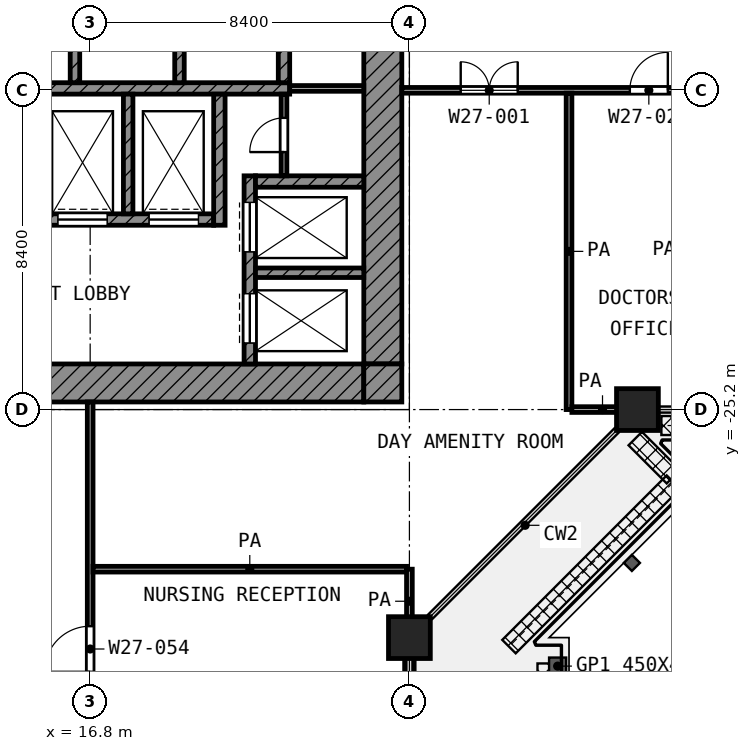
"""IFC4 building model, lengths in metres.
Left out: names, types, materials, properties, quantities, classifications, styles, units other than length and angle.
Written with IfcOpenShell. Run it as: python <this file> out.ifc"""

import sys

from ifc_helpers import new_model, si_unit, direction, frame, frame_2d, origin, origin_2d, place, context, subcontext, project, spatial, rectangle, extrude, element, fill, save


model = new_model("IFC4")
c1 = context("Model", 3, precision=1e-05, world=origin(), true_north=direction((0.0, 1.0)))
c2 = subcontext(c1, "Body", "Model", "MODEL_VIEW")
j1 = project(units=[si_unit("LENGTHUNIT", "METRE"), si_unit("PLANEANGLEUNIT", "RADIAN")], contexts=[c1])
p1 = place(None, origin())
s1 = spatial("IfcSite", under=j1, at=p1, CompositionType="ELEMENT")
p2 = place(p1, origin())
s2 = spatial("IfcBuilding", under=s1, at=p2, CompositionType="ELEMENT")
p3 = place(p2, frame((0.0, 0.0, 119.8)))
s3 = spatial("IfcBuildingStorey", under=s2, at=p3, CompositionType="ELEMENT", Elevation=119.8)
for number, where, z_axis, x_axis in (
    (1, (31.2, -25.2, 0.0), (0.0, 0.0, 1.0), (1.0, 0.0, 0.0)),
    (2, (25.2, -31.2, 0.0), (0.0, 0.0, 1.0), (1.0, 0.0, 0.0)),
):
    element("IfcColumn", number, at=place(p3, frame(where, z_axis=z_axis, x_axis=x_axis)), inside=s3, PredefinedType="COLUMN", context=c2, shape_type="SweptSolid", body=[
        extrude(rectangle(XDim=1.1, YDim=1.1, at=origin_2d()), origin(), (0.0, 0.0, 1.0), 4.2),
    ])
p4 = place(p3, frame((25.2, -34.992, 0.0), z_axis=(0.0, 0.0, 1.0), x_axis=(0.0, 1.0, 0.0)))
e3 = element("IfcWall", 3, at=p4, inside=s3, PredefinedType="SOLIDWALL", context=c2, shape_type="SweptSolid", body=[
    extrude(rectangle(XDim=3.242, YDim=0.25, at=frame_2d((1.621, 0.0))), origin(), (0.0, 0.0, 1.0), 3.48),
])
p5 = place(p4, frame((1.621, 0.0, 0.0)))
e4 = element("IfcOpeningElement", 4, at=p5, cuts=e3, PredefinedType="OPENING", context=c2, shape_type="SweptSolid", body=[
    extrude(rectangle(XDim=1.0, YDim=2.1, at=frame_2d((0.5, 1.05))), frame((0.0, 0.135, 0.0), z_axis=(0.0, -1.0, 0.0), x_axis=(1.0, 0.0, 0.0)), (0.0, 0.0, 1.0), 0.27),
])
p6 = place(p3, frame((24.5, -24.0, 0.0), z_axis=(0.0, 0.0, 1.0), x_axis=(0.0, 1.0, 0.0)))
e5 = element("IfcWall", 5, at=p6, inside=s3, PredefinedType="SHEAR", context=c2, shape_type="SweptSolid", body=[
    extrude(rectangle(XDim=18.6, YDim=1.0, at=frame_2d((9.3, 0.0))), origin(), (0.0, 0.0, 1.0), 3.6),
])
p7 = place(p6, frame((10.5, 0.0, 0.0)))
e6 = element("IfcOpeningElement", 6, at=p7, cuts=e5, PredefinedType="OPENING", context=c2, shape_type="SweptSolid", body=[
    extrude(rectangle(XDim=1.8, YDim=2.1, at=frame_2d((0.9, 1.05))), frame((0.0, 0.51, 0.0), z_axis=(0.0, -1.0, 0.0), x_axis=(1.0, 0.0, 0.0)), (0.0, 0.0, 1.0), 1.02),
])
p8 = place(p3, frame((5.4, -24.5, 0.0), z_axis=(0.0, 0.0, 1.0), x_axis=(1.0, 0.0, 0.0)))
e7 = element("IfcWall", 7, at=p8, inside=s3, PredefinedType="SHEAR", context=c2, shape_type="SweptSolid", body=[
    extrude(rectangle(XDim=18.6, YDim=1.0, at=frame_2d((9.3, 0.0))), origin(), (0.0, 0.0, 1.0), 3.6),
])
p9 = place(p8, frame((6.3, 0.0, 0.0)))
e8 = element("IfcOpeningElement", 8, at=p9, cuts=e7, PredefinedType="OPENING", context=c2, shape_type="SweptSolid", body=[
    extrude(rectangle(XDim=1.8, YDim=2.1, at=frame_2d((0.9, 1.05))), frame((0.0, 0.51, 0.0), z_axis=(0.0, -1.0, 0.0), x_axis=(1.0, 0.0, 0.0)), (0.0, 0.0, 1.0), 1.02),
])
p10 = place(p3, frame((24.5, -25.0, 0.0), z_axis=(0.0, 0.0, 1.0), x_axis=(0.0, 1.0, 0.0)))
e9 = element("IfcWall", 9, at=p10, inside=s3, PredefinedType="SHEAR", context=c2, shape_type="SweptSolid", body=[
    extrude(rectangle(XDim=1.0, YDim=1.0, at=frame_2d((0.5, 0.0))), origin(), (0.0, 0.0, 1.0), 3.6),
])
p11 = place(p3, frame((5.4, -16.75, 0.0), z_axis=(0.0, 0.0, 1.0), x_axis=(1.0, 0.0, 0.0)))
e10 = element("IfcWall", 10, at=p11, inside=s3, PredefinedType="SHEAR", context=c2, shape_type="SweptSolid", body=[
    extrude(rectangle(XDim=16.65, YDim=0.3, at=frame_2d((8.325, 0.0))), origin(), (0.0, 0.0, 1.0), 3.6),
])
p12 = place(p3, frame((5.4, -20.2, 0.0), z_axis=(0.0, 0.0, 1.0), x_axis=(1.0, 0.0, 0.0)))
e11 = element("IfcWall", 11, at=p12, inside=s3, PredefinedType="SHEAR", context=c2, shape_type="SweptSolid", body=[
    extrude(rectangle(XDim=14.65, YDim=0.3, at=frame_2d((7.325, 0.0))), origin(), (0.0, 0.0, 1.0), 3.6),
])
p13 = place(p12, frame((10.55, 0.0, 0.0)))
e12 = element("IfcOpeningElement", 12, at=p13, cuts=e11, PredefinedType="OPENING", context=c2, shape_type="SweptSolid", body=[
    extrude(rectangle(XDim=1.3, YDim=2.1, at=frame_2d((0.65, 1.05))), frame((0.0, 0.16, 0.0), z_axis=(0.0, -1.0, 0.0), x_axis=(1.0, 0.0, 0.0)), (0.0, 0.0, 1.0), 0.32),
])
p14 = place(p12, frame((12.95, 0.0, 0.0)))
e13 = element("IfcOpeningElement", 13, at=p14, cuts=e11, PredefinedType="OPENING", context=c2, shape_type="SweptSolid", body=[
    extrude(rectangle(XDim=1.3, YDim=2.1, at=frame_2d((0.65, 1.05))), frame((0.0, 0.16, 0.0), z_axis=(0.0, -1.0, 0.0), x_axis=(1.0, 0.0, 0.0)), (0.0, 0.0, 1.0), 0.32),
])
p15 = place(p12, frame((0.55, 0.0, 0.0)))
e14 = element("IfcOpeningElement", 14, at=p15, cuts=e11, PredefinedType="OPENING", context=c2, shape_type="SweptSolid", body=[
    extrude(rectangle(XDim=1.3, YDim=2.1, at=frame_2d((0.65, 1.05))), frame((0.0, 0.16, 0.0), z_axis=(0.0, -1.0, 0.0), x_axis=(1.0, 0.0, 0.0)), (0.0, 0.0, 1.0), 0.32),
])
p16 = place(p12, frame((2.95, 0.0, 0.0)))
e15 = element("IfcOpeningElement", 15, at=p16, cuts=e11, PredefinedType="OPENING", context=c2, shape_type="SweptSolid", body=[
    extrude(rectangle(XDim=1.3, YDim=2.1, at=frame_2d((0.65, 1.05))), frame((0.0, 0.16, 0.0), z_axis=(0.0, -1.0, 0.0), x_axis=(1.0, 0.0, 0.0)), (0.0, 0.0, 1.0), 0.32),
])
p17 = place(p12, frame((7.15, 0.0, 0.0)))
e16 = element("IfcOpeningElement", 16, at=p17, cuts=e11, PredefinedType="OPENING", context=c2, shape_type="SweptSolid", body=[
    extrude(rectangle(XDim=0.9, YDim=2.1, at=frame_2d((0.45, 1.05))), frame((0.0, 0.16, 0.0), z_axis=(0.0, -1.0, 0.0), x_axis=(1.0, 0.0, 0.0)), (0.0, 0.0, 1.0), 0.32),
])
p18 = place(p3, frame((20.2, -20.35, 0.0), z_axis=(0.0, 0.0, 1.0), x_axis=(0.0, 1.0, 0.0)))
e17 = element("IfcWall", 17, at=p18, inside=s3, PredefinedType="SHEAR", context=c2, shape_type="SweptSolid", body=[
    extrude(rectangle(XDim=3.45, YDim=0.3, at=frame_2d((1.725, 0.0))), origin(), (0.0, 0.0, 1.0), 3.6),
])
p19 = place(p3, frame((21.9, -16.6, 0.0), z_axis=(0.0, 0.0, 1.0), x_axis=(0.0, 1.0, 0.0)))
e18 = element("IfcWall", 18, at=p19, inside=s3, PredefinedType="SHEAR", context=c2, shape_type="SweptSolid", body=[
    extrude(rectangle(XDim=2.35, YDim=0.3, at=frame_2d((1.175, 0.0))), origin(), (0.0, 0.0, 1.0), 3.6),
])
p20 = place(p3, frame((21.15, -19.2, 0.0), z_axis=(0.0, 0.0, 1.0), x_axis=(1.0, 0.0, 0.0)))
e19 = element("IfcWall", 19, at=p20, inside=s3, PredefinedType="SHEAR", context=c2, shape_type="SweptSolid", body=[
    extrude(rectangle(XDim=2.85, YDim=0.3, at=frame_2d((1.425, 0.0))), origin(), (0.0, 0.0, 1.0), 3.6),
])
p21 = place(p3, frame((21.0, -24.0, 0.0), z_axis=(0.0, 0.0, 1.0), x_axis=(0.0, 1.0, 0.0)))
e20 = element("IfcWall", 20, at=p21, inside=s3, PredefinedType="SHEAR", context=c2, shape_type="SweptSolid", body=[
    extrude(rectangle(XDim=4.95, YDim=0.3, at=frame_2d((2.475, 0.0))), origin(), (0.0, 0.0, 1.0), 3.6),
])
p22 = place(p21, frame((2.95, 0.0, 0.0)))
e21 = element("IfcOpeningElement", 21, at=p22, cuts=e20, PredefinedType="OPENING", context=c2, shape_type="SweptSolid", body=[
    extrude(rectangle(XDim=1.3, YDim=2.1, at=frame_2d((0.65, 1.05))), frame((0.0, 0.16, 0.0), z_axis=(0.0, -1.0, 0.0), x_axis=(1.0, 0.0, 0.0)), (0.0, 0.0, 1.0), 0.32),
])
p23 = place(p21, frame((0.55, 0.0, 0.0)))
e22 = element("IfcOpeningElement", 22, at=p23, cuts=e20, PredefinedType="OPENING", context=c2, shape_type="SweptSolid", body=[
    extrude(rectangle(XDim=1.3, YDim=2.1, at=frame_2d((0.65, 1.05))), frame((0.0, 0.16, 0.0), z_axis=(0.0, -1.0, 0.0), x_axis=(1.0, 0.0, 0.0)), (0.0, 0.0, 1.0), 0.32),
])
p24 = place(p3, frame((21.15, -21.6, 0.0), z_axis=(0.0, 0.0, 1.0), x_axis=(1.0, 0.0, 0.0)))
e23 = element("IfcWall", 23, at=p24, inside=s3, PredefinedType="SHEAR", context=c2, shape_type="SweptSolid", body=[
    extrude(rectangle(XDim=2.85, YDim=0.25, at=frame_2d((1.425, 0.0))), origin(), (0.0, 0.0, 1.0), 3.6),
])
p25 = place(p3, frame((17.8, -20.05, 0.0), z_axis=(0.0, 0.0, 1.0), x_axis=(0.0, 1.0, 0.0)))
e24 = element("IfcWall", 24, at=p25, inside=s3, PredefinedType="SHEAR", context=c2, shape_type="SweptSolid", body=[
    extrude(rectangle(XDim=3.15, YDim=0.25, at=frame_2d((1.575, 0.0))), origin(), (0.0, 0.0, 1.0), 3.6),
])
for number, where, z_axis, x_axis in (
    (25, (16.4, -16.6, 0.0), (0.0, 0.0, 1.0), (0.0, 1.0, 0.0)),
    (26, (19.15, -16.6, 0.0), (0.0, 0.0, 1.0), (0.0, 1.0, 0.0)),
):
    element("IfcWall", number, at=place(p3, frame(where, z_axis=z_axis, x_axis=x_axis)), inside=s3, PredefinedType="SHEAR", context=c2, shape_type="SweptSolid", body=[
        extrude(rectangle(XDim=2.35, YDim=0.25, at=frame_2d((1.175, 0.0))), origin(), (0.0, 0.0, 1.0), 3.6),
    ])
p26 = place(p3, frame((21.9, -19.05, 0.0), z_axis=(0.0, 0.0, 1.0), x_axis=(0.0, 1.0, 0.0)))
e27 = element("IfcWall", 27, at=p26, inside=s3, PredefinedType="PARTITIONING", context=c2, shape_type="SweptSolid", body=[
    extrude(rectangle(XDim=2.15, YDim=0.15, at=frame_2d((1.075, 0.0))), origin(), (0.0, 0.0, 1.0), 3.6),
])
p27 = place(p26, frame((0.625, 0.0, 0.0)))
e28 = element("IfcOpeningElement", 28, at=p27, cuts=e27, PredefinedType="OPENING", context=c2, shape_type="SweptSolid", body=[
    extrude(rectangle(XDim=0.9, YDim=2.1, at=frame_2d((0.45, 1.05))), frame((0.0, 0.085, 0.0), z_axis=(0.0, -1.0, 0.0), x_axis=(1.0, 0.0, 0.0)), (0.0, 0.0, 1.0), 0.17),
])
p28 = place(p3, frame((22.05, -16.75, 0.0), z_axis=(0.0, 0.0, 1.0), x_axis=(1.0, 0.0, 0.0)))
e29 = element("IfcWall", 29, at=p28, inside=s3, PredefinedType="PARTITIONING", context=c2, shape_type="SweptSolid", body=[
    extrude(rectangle(XDim=1.95, YDim=0.15, at=frame_2d((0.975, 0.0))), origin(), (0.0, 0.0, 1.0), 3.6),
])
p29 = place(p3, frame((16.875, -29.4, 0.0), z_axis=(0.0, 0.0, 1.0), x_axis=(1.0, 0.0, 0.0)))
e30 = element("IfcWall", 30, at=p29, inside=s3, PredefinedType="PARTITIONING", context=c2, shape_type="SweptSolid", body=[
    extrude(rectangle(XDim=8.25, YDim=0.15, at=frame_2d((4.125, 0.0))), origin(), (0.0, 0.0, 1.0), 3.6),
])
p30 = place(p3, frame((29.475, -25.2, 0.0), z_axis=(0.0, 0.0, 1.0), x_axis=(1.0, 0.0, 0.0)))
e31 = element("IfcWall", 31, at=p30, inside=s3, PredefinedType="PARTITIONING", context=c2, shape_type="SweptSolid", body=[
    extrude(rectangle(XDim=1.612, YDim=0.15, at=frame_2d((0.806, 0.0))), origin(), (0.0, 0.0, 1.0), 3.6),
])
p31 = place(p3, frame((25.0, -16.8, 0.0), z_axis=(0.0, 0.0, 1.0), x_axis=(1.0, 0.0, 0.0)))
e32 = element("IfcWall", 32, at=p31, inside=s3, PredefinedType="PARTITIONING", context=c2, shape_type="SweptSolid", body=[
    extrude(rectangle(XDim=50.52, YDim=0.15, at=frame_2d((25.26, 0.0))), origin(), (0.0, 0.0, 1.0), 3.6),
])
p32 = place(p31, frame((1.55, 0.0, 0.0)))
e33 = element("IfcOpeningElement", 33, at=p32, cuts=e32, PredefinedType="OPENING", context=c2, shape_type="SweptSolid", body=[
    extrude(rectangle(XDim=1.5, YDim=2.1, at=frame_2d((0.75, 1.05))), frame((0.0, 0.085, 0.0), z_axis=(0.0, -1.0, 0.0), x_axis=(1.0, 0.0, 0.0)), (0.0, 0.0, 1.0), 0.17),
])
p33 = place(p31, frame((6.0, 0.0, 0.0)))
e34 = element("IfcOpeningElement", 34, at=p33, cuts=e32, PredefinedType="OPENING", context=c2, shape_type="SweptSolid", body=[
    extrude(rectangle(XDim=1.0, YDim=2.1, at=frame_2d((0.5, 1.05))), frame((0.0, 0.085, 0.0), z_axis=(0.0, -1.0, 0.0), x_axis=(1.0, 0.0, 0.0)), (0.0, 0.0, 1.0), 0.17),
])
p34 = place(p31, frame((9.3, 0.0, 0.0)))
e35 = element("IfcOpeningElement", 35, at=p34, cuts=e32, PredefinedType="OPENING", context=c2, shape_type="SweptSolid", body=[
    extrude(rectangle(XDim=1.2, YDim=2.1, at=frame_2d((0.6, 1.05))), frame((0.0, 0.085, 0.0), z_axis=(0.0, -1.0, 0.0), x_axis=(1.0, 0.0, 0.0)), (0.0, 0.0, 1.0), 0.17),
])
p35 = place(p31, frame((17.9, 0.0, 0.0)))
e36 = element("IfcOpeningElement", 36, at=p35, cuts=e32, PredefinedType="OPENING", context=c2, shape_type="SweptSolid", body=[
    extrude(rectangle(XDim=1.2, YDim=2.1, at=frame_2d((0.6, 1.05))), frame((0.0, 0.085, 0.0), z_axis=(0.0, -1.0, 0.0), x_axis=(1.0, 0.0, 0.0)), (0.0, 0.0, 1.0), 0.17),
])
p36 = place(p31, frame((15.2, 0.0, 0.0)))
e37 = element("IfcOpeningElement", 37, at=p36, cuts=e32, PredefinedType="OPENING", context=c2, shape_type="SweptSolid", body=[
    extrude(rectangle(XDim=1.2, YDim=2.1, at=frame_2d((0.6, 1.05))), frame((0.0, 0.085, 0.0), z_axis=(0.0, -1.0, 0.0), x_axis=(1.0, 0.0, 0.0)), (0.0, 0.0, 1.0), 0.17),
])
p37 = place(p31, frame((20.15, 0.0, 0.0)))
e38 = element("IfcOpeningElement", 38, at=p37, cuts=e32, PredefinedType="OPENING", context=c2, shape_type="SweptSolid", body=[
    extrude(rectangle(XDim=1.2, YDim=2.1, at=frame_2d((0.6, 1.05))), frame((0.0, 0.085, 0.0), z_axis=(0.0, -1.0, 0.0), x_axis=(1.0, 0.0, 0.0)), (0.0, 0.0, 1.0), 0.17),
])
p38 = place(p31, frame((26.025, 0.0, 0.0)))
e39 = element("IfcOpeningElement", 39, at=p38, cuts=e32, PredefinedType="OPENING", context=c2, shape_type="SweptSolid", body=[
    extrude(rectangle(XDim=0.9, YDim=2.1, at=frame_2d((0.45, 1.05))), frame((0.0, 0.085, 0.0), z_axis=(0.0, -1.0, 0.0), x_axis=(1.0, 0.0, 0.0)), (0.0, 0.0, 1.0), 0.17),
])
p39 = place(p31, frame((27.65, 0.0, 0.0)))
e40 = element("IfcOpeningElement", 40, at=p39, cuts=e32, PredefinedType="OPENING", context=c2, shape_type="SweptSolid", body=[
    extrude(rectangle(XDim=1.2, YDim=2.1, at=frame_2d((0.6, 1.05))), frame((0.0, 0.085, 0.0), z_axis=(0.0, -1.0, 0.0), x_axis=(1.0, 0.0, 0.0)), (0.0, 0.0, 1.0), 0.17),
])
p40 = place(p31, frame((32.0, 0.0, 0.0)))
e41 = element("IfcOpeningElement", 41, at=p40, cuts=e32, PredefinedType="OPENING", context=c2, shape_type="SweptSolid", body=[
    extrude(rectangle(XDim=1.2, YDim=2.1, at=frame_2d((0.6, 1.05))), frame((0.0, 0.085, 0.0), z_axis=(0.0, -1.0, 0.0), x_axis=(1.0, 0.0, 0.0)), (0.0, 0.0, 1.0), 0.17),
])
p41 = place(p31, frame((34.8, 0.0, 0.0)))
e42 = element("IfcOpeningElement", 42, at=p41, cuts=e32, PredefinedType="OPENING", context=c2, shape_type="SweptSolid", body=[
    extrude(rectangle(XDim=1.2, YDim=2.1, at=frame_2d((0.6, 1.05))), frame((0.0, 0.085, 0.0), z_axis=(0.0, -1.0, 0.0), x_axis=(1.0, 0.0, 0.0)), (0.0, 0.0, 1.0), 0.17),
])
p42 = place(p31, frame((40.625, 0.0, 0.0)))
e43 = element("IfcOpeningElement", 43, at=p42, cuts=e32, PredefinedType="OPENING", context=c2, shape_type="SweptSolid", body=[
    extrude(rectangle(XDim=0.9, YDim=2.1, at=frame_2d((0.45, 1.05))), frame((0.0, 0.085, 0.0), z_axis=(0.0, -1.0, 0.0), x_axis=(1.0, 0.0, 0.0)), (0.0, 0.0, 1.0), 0.17),
])
p43 = place(p31, frame((44.15, 0.0, 0.0)))
e44 = element("IfcOpeningElement", 44, at=p43, cuts=e32, PredefinedType="OPENING", context=c2, shape_type="SweptSolid", body=[
    extrude(rectangle(XDim=1.2, YDim=2.1, at=frame_2d((0.6, 1.05))), frame((0.0, 0.085, 0.0), z_axis=(0.0, -1.0, 0.0), x_axis=(1.0, 0.0, 0.0)), (0.0, 0.0, 1.0), 0.17),
])
p44 = place(p31, frame((47.7, 0.0, 0.0)))
e45 = element("IfcOpeningElement", 45, at=p44, cuts=e32, PredefinedType="OPENING", context=c2, shape_type="SweptSolid", body=[
    extrude(rectangle(XDim=1.0, YDim=2.1, at=frame_2d((0.5, 1.05))), frame((0.0, 0.085, 0.0), z_axis=(0.0, -1.0, 0.0), x_axis=(1.0, 0.0, 0.0)), (0.0, 0.0, 1.0), 0.17),
])
p45 = place(p3, frame((16.8, -58.72, 0.0), z_axis=(0.0, 0.0, 1.0), x_axis=(0.0, 1.0, 0.0)))
e46 = element("IfcWall", 46, at=p45, inside=s3, PredefinedType="PARTITIONING", context=c2, shape_type="SweptSolid", body=[
    extrude(rectangle(XDim=33.72, YDim=0.15, at=frame_2d((16.86, 0.0))), origin(), (0.0, 0.0, 1.0), 2.7),
])
p46 = place(p45, frame((26.62, 0.0, 0.0)))
e47 = element("IfcOpeningElement", 47, at=p46, cuts=e46, PredefinedType="OPENING", context=c2, shape_type="SweptSolid", body=[
    extrude(rectangle(XDim=1.2, YDim=2.1, at=frame_2d((0.6, 1.05))), frame((0.0, 0.085, 0.0), z_axis=(0.0, -1.0, 0.0), x_axis=(1.0, 0.0, 0.0)), (0.0, 0.0, 1.0), 0.17),
])
p47 = place(p45, frame((22.52, 0.0, 0.0)))
e48 = element("IfcOpeningElement", 48, at=p47, cuts=e46, PredefinedType="OPENING", context=c2, shape_type="SweptSolid", body=[
    extrude(rectangle(XDim=1.0, YDim=2.1, at=frame_2d((0.5, 1.05))), frame((0.0, 0.085, 0.0), z_axis=(0.0, -1.0, 0.0), x_axis=(1.0, 0.0, 0.0)), (0.0, 0.0, 1.0), 0.17),
])
p48 = place(p45, frame((17.42, 0.0, 0.0)))
e49 = element("IfcOpeningElement", 49, at=p48, cuts=e46, PredefinedType="OPENING", context=c2, shape_type="SweptSolid", body=[
    extrude(rectangle(XDim=1.2, YDim=2.1, at=frame_2d((0.6, 1.05))), frame((0.0, 0.085, 0.0), z_axis=(0.0, -1.0, 0.0), x_axis=(1.0, 0.0, 0.0)), (0.0, 0.0, 1.0), 0.17),
])
p49 = place(p45, frame((10.12, 0.0, 0.0)))
e50 = element("IfcOpeningElement", 50, at=p49, cuts=e46, PredefinedType="OPENING", context=c2, shape_type="SweptSolid", body=[
    extrude(rectangle(XDim=1.2, YDim=2.1, at=frame_2d((0.6, 1.05))), frame((0.0, 0.085, 0.0), z_axis=(0.0, -1.0, 0.0), x_axis=(1.0, 0.0, 0.0)), (0.0, 0.0, 1.0), 0.17),
])
p50 = place(p45, frame((14.32, 0.0, 0.0)))
e51 = element("IfcOpeningElement", 51, at=p50, cuts=e46, PredefinedType="OPENING", context=c2, shape_type="SweptSolid", body=[
    extrude(rectangle(XDim=1.2, YDim=2.1, at=frame_2d((0.6, 1.05))), frame((0.0, 0.085, 0.0), z_axis=(0.0, -1.0, 0.0), x_axis=(1.0, 0.0, 0.0)), (0.0, 0.0, 1.0), 0.17),
])
p51 = place(p45, frame((3.37, 0.0, 0.0)))
e52 = element("IfcOpeningElement", 52, at=p51, cuts=e46, PredefinedType="OPENING", context=c2, shape_type="SweptSolid", body=[
    extrude(rectangle(XDim=1.5, YDim=2.1, at=frame_2d((0.75, 1.05))), frame((0.0, 0.085, 0.0), z_axis=(0.0, -1.0, 0.0), x_axis=(1.0, 0.0, 0.0)), (0.0, 0.0, 1.0), 0.17),
])
p52 = place(p3, frame((25.2, -31.087, 0.0), z_axis=(0.0, 0.0, 1.0), x_axis=(0.0, 1.0, 0.0)))
e53 = element("IfcWall", 53, at=p52, inside=s3, PredefinedType="PARTITIONING", context=c2, shape_type="SweptSolid", body=[
    extrude(rectangle(XDim=1.687, YDim=0.15, at=frame_2d((0.844, 0.0))), origin(), (0.0, 0.0, 1.0), 3.6),
])
p53 = place(p3, frame((29.4, -25.2, 0.0), z_axis=(0.0, 0.0, 1.0), x_axis=(0.0, 1.0, 0.0)))
e54 = element("IfcWall", 54, at=p53, inside=s3, PredefinedType="PARTITIONING", context=c2, shape_type="SweptSolid", body=[
    extrude(rectangle(XDim=8.325, YDim=0.15, at=frame_2d((4.163, 0.0))), origin(), (0.0, 0.0, 1.0), 3.6),
])
p54 = place(p22, origin())
e55 = element("IfcDoor", 55, at=p54, inside=s3, OperationType="DOUBLE_DOOR_SLIDING", PredefinedType="DOOR", context=c2, shape_type="SweptSolid", body=[
    extrude(rectangle(XDim=1.3, YDim=2.1, at=frame_2d((0.65, 1.05))), frame((0.0, 0.025, 0.0), z_axis=(0.0, -1.0, 0.0), x_axis=(1.0, 0.0, 0.0)), (0.0, 0.0, 1.0), 0.05),
])
fill(e21, e55)
p55 = place(p23, origin())
e56 = element("IfcDoor", 56, at=p55, inside=s3, OperationType="DOUBLE_DOOR_SLIDING", PredefinedType="DOOR", context=c2, shape_type="SweptSolid", body=[
    extrude(rectangle(XDim=1.3, YDim=2.1, at=frame_2d((0.65, 1.05))), frame((0.0, 0.025, 0.0), z_axis=(0.0, -1.0, 0.0), x_axis=(1.0, 0.0, 0.0)), (0.0, 0.0, 1.0), 0.05),
])
fill(e22, e56)
p56 = place(p13, origin())
e57 = element("IfcDoor", 57, at=p56, inside=s3, OperationType="DOUBLE_DOOR_SLIDING", PredefinedType="DOOR", context=c2, shape_type="SweptSolid", body=[
    extrude(rectangle(XDim=1.3, YDim=2.1, at=frame_2d((0.65, 1.05))), frame((0.0, 0.025, 0.0), z_axis=(0.0, -1.0, 0.0), x_axis=(1.0, 0.0, 0.0)), (0.0, 0.0, 1.0), 0.05),
])
fill(e12, e57)
p57 = place(p14, origin())
e58 = element("IfcDoor", 58, at=p57, inside=s3, OperationType="DOUBLE_DOOR_SLIDING", PredefinedType="DOOR", context=c2, shape_type="SweptSolid", body=[
    extrude(rectangle(XDim=1.3, YDim=2.1, at=frame_2d((0.65, 1.05))), frame((0.0, 0.025, 0.0), z_axis=(0.0, -1.0, 0.0), x_axis=(1.0, 0.0, 0.0)), (0.0, 0.0, 1.0), 0.05),
])
fill(e13, e58)
p58 = place(p27, origin())
e59 = element("IfcDoor", 59, at=p58, inside=s3, OperationType="SINGLE_SWING_LEFT", PredefinedType="DOOR", context=c2, shape_type="SweptSolid", body=[
    extrude(rectangle(XDim=0.9, YDim=2.1, at=frame_2d((0.45, 1.05))), frame((0.0, 0.025, 0.0), z_axis=(0.0, -1.0, 0.0), x_axis=(1.0, 0.0, 0.0)), (0.0, 0.0, 1.0), 0.05),
])
fill(e28, e59)
p59 = place(p32, origin())
e60 = element("IfcDoor", 60, at=p59, inside=s3, OperationType="DOUBLE_DOOR_SINGLE_SWING", PredefinedType="DOOR", context=c2, shape_type="SweptSolid", body=[
    extrude(rectangle(XDim=1.5, YDim=2.1, at=frame_2d((0.75, 1.05))), frame((0.0, 0.025, 0.0), z_axis=(0.0, -1.0, 0.0), x_axis=(1.0, 0.0, 0.0)), (0.0, 0.0, 1.0), 0.05),
])
fill(e33, e60)
p60 = place(p33, origin())
e61 = element("IfcDoor", 61, at=p60, inside=s3, OperationType="SINGLE_SWING_RIGHT", PredefinedType="DOOR", context=c2, shape_type="SweptSolid", body=[
    extrude(rectangle(XDim=1.0, YDim=2.1, at=frame_2d((0.5, 1.05))), frame((0.0, 0.025, 0.0), z_axis=(0.0, -1.0, 0.0), x_axis=(1.0, 0.0, 0.0)), (0.0, 0.0, 1.0), 0.05),
])
fill(e34, e61)
p61 = place(p46, origin())
e62 = element("IfcDoor", 62, at=p61, inside=s3, OperationType="SINGLE_SWING_LEFT", PredefinedType="DOOR", context=c2, shape_type="SweptSolid", body=[
    extrude(rectangle(XDim=1.2, YDim=2.1, at=frame_2d((0.6, 1.05))), frame((0.0, 0.025, 0.0), z_axis=(0.0, -1.0, 0.0), x_axis=(1.0, 0.0, 0.0)), (0.0, 0.0, 1.0), 0.05),
])
fill(e47, e62)
save(model, sys.argv[1])
